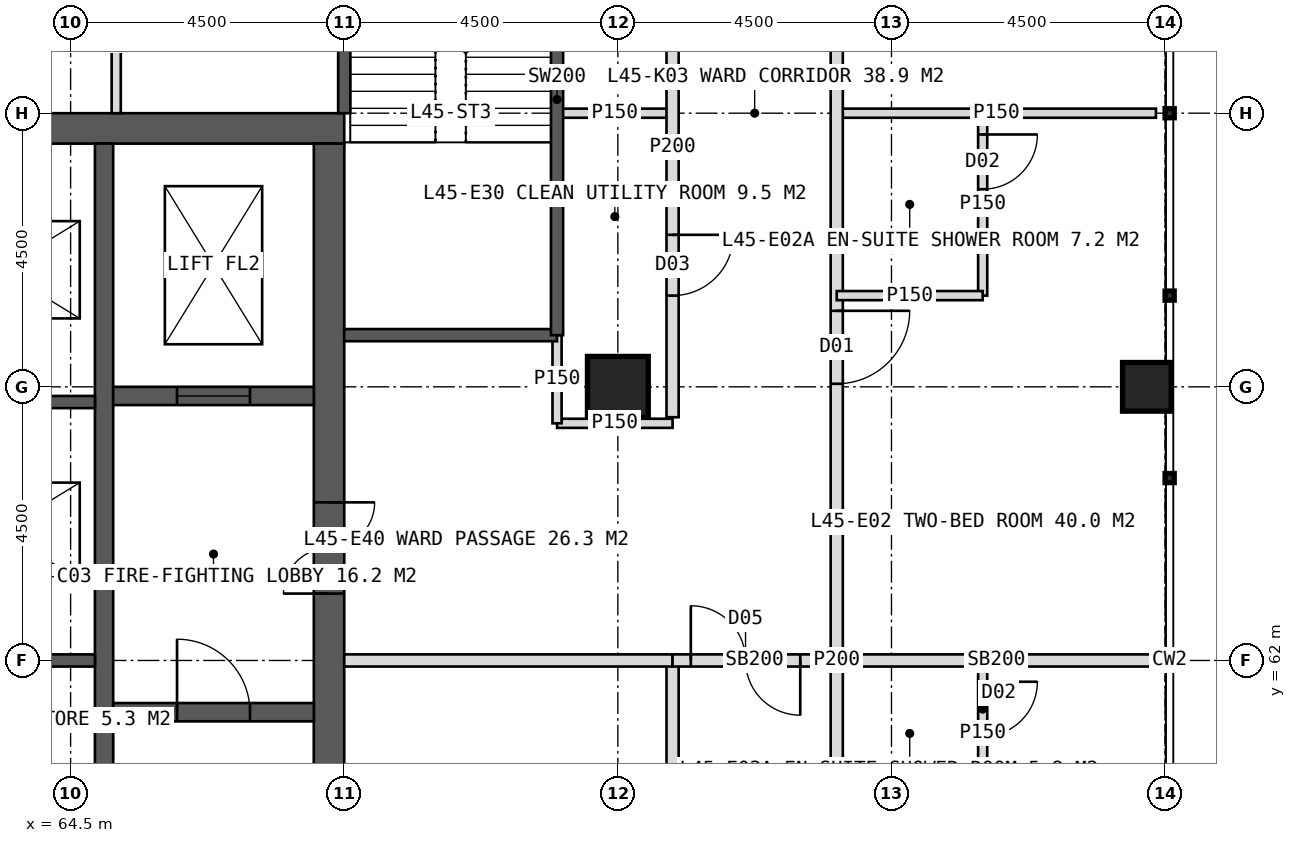
"""IFC4 building model, lengths in metres.
Left out: names, types, materials, properties, quantities, classifications, styles, units other than length and angle.
Written with IfcOpenShell. Run it as: python <this file> out.ifc"""

import sys

from ifc_helpers import new_model, si_unit, direction, frame, frame_2d, origin, origin_2d, place, context, subcontext, project, spatial, rectangle, hollow_rectangle, extrude, element, fill, save


model = new_model("IFC4")
c1 = context("Model", 3, precision=1e-05, world=origin(), true_north=direction((0.0, 1.0)))
c2 = subcontext(c1, "Body", "Model", "MODEL_VIEW")
j1 = project(units=[si_unit("LENGTHUNIT", "METRE"), si_unit("PLANEANGLEUNIT", "RADIAN")], contexts=[c1])
p1 = place(None, origin())
s1 = spatial("IfcSite", under=j1, at=p1, CompositionType="ELEMENT")
p2 = place(p1, origin())
s2 = spatial("IfcBuilding", under=s1, at=p2, CompositionType="ELEMENT")
p3 = place(p2, frame((0.0, 0.0, 189.0)))
s3 = spatial("IfcBuildingStorey", under=s2, at=p3, CompositionType="ELEMENT", Elevation=189.0)
p4 = place(p3, frame((51.0, 70.75, 0.0), z_axis=(0.0, 0.0, 1.0), x_axis=(1.0, 0.0, 0.0)))
e1 = element("IfcWall", 1, at=p4, inside=s3, PredefinedType="SHEAR", context=c2, shape_type="SweptSolid", body=[
    extrude(rectangle(XDim=18.0, YDim=0.5, at=frame_2d((9.0, 0.0))), origin(), (0.0, 0.0, 1.0), 4.0),
])
p5 = place(p4, frame((8.1, 0.0, 0.0)))
e2 = element("IfcOpeningElement", 2, at=p5, cuts=e1, PredefinedType="OPENING", context=c2, shape_type="SweptSolid", body=[
    extrude(rectangle(XDim=1.8, YDim=2.2, at=frame_2d((0.9, 1.1))), frame((0.0, 0.26, 0.0), z_axis=(0.0, -1.0, 0.0), x_axis=(1.0, 0.0, 0.0)), (0.0, 0.0, 1.0), 0.52),
])
p6 = place(p3, frame((68.75, 53.5, 0.0), z_axis=(0.0, 0.0, 1.0), x_axis=(0.0, 1.0, 0.0)))
e3 = element("IfcWall", 3, at=p6, inside=s3, PredefinedType="SHEAR", context=c2, shape_type="SweptSolid", body=[
    extrude(rectangle(XDim=17.0, YDim=0.5, at=frame_2d((8.5, 0.0))), origin(), (0.0, 0.0, 1.0), 4.0),
])
p7 = place(p6, frame((9.6, 0.0, 0.0)))
e4 = element("IfcOpeningElement", 4, at=p7, cuts=e3, PredefinedType="OPENING", context=c2, shape_type="SweptSolid", body=[
    extrude(rectangle(XDim=1.5, YDim=2.2, at=frame_2d((0.75, 1.1))), frame((0.0, 0.26, 0.0), z_axis=(0.0, -1.0, 0.0), x_axis=(1.0, 0.0, 0.0)), (0.0, 0.0, 1.0), 0.52),
])
p8 = place(p3, frame((65.05, 53.5, 0.0), z_axis=(0.0, 0.0, 1.0), x_axis=(0.0, 1.0, 0.0)))
e5 = element("IfcWall", 5, at=p8, inside=s3, PredefinedType="SHEAR", context=c2, shape_type="SweptSolid", body=[
    extrude(rectangle(XDim=17.0, YDim=0.3, at=frame_2d((8.5, 0.0))), origin(), (0.0, 0.0, 1.0), 4.0),
])
for number, where, z_axis, x_axis in (
    (6, (61.85, 62.0, 0.0), (0.0, 0.0, 1.0), (1.0, 0.0, 0.0)),
    (7, (61.85, 66.25, 0.0), (0.0, 0.0, 1.0), (1.0, 0.0, 0.0)),
):
    element("IfcWall", number, at=place(p3, frame(where, z_axis=z_axis, x_axis=x_axis)), inside=s3, PredefinedType="SHEAR", context=c2, shape_type="SweptSolid", body=[
        extrude(rectangle(XDim=3.05, YDim=0.2, at=frame_2d((1.525, 0.0))), origin(), (0.0, 0.0, 1.0), 4.0),
    ])
p9 = place(p3, frame((65.2, 61.15, 0.0), z_axis=(0.0, 0.0, 1.0), x_axis=(1.0, 0.0, 0.0)))
e8 = element("IfcWall", 8, at=p9, inside=s3, PredefinedType="SHEAR", context=c2, shape_type="SweptSolid", body=[
    extrude(rectangle(XDim=3.3, YDim=0.3, at=frame_2d((1.65, 0.0))), origin(), (0.0, 0.0, 1.0), 4.0),
])
p10 = place(p9, frame((1.05, 0.0, 0.0)))
e9 = element("IfcOpeningElement", 9, at=p10, cuts=e8, PredefinedType="OPENING", context=c2, shape_type="SweptSolid", body=[
    extrude(rectangle(XDim=1.2, YDim=2.1, at=frame_2d((0.6, 1.05))), frame((0.0, 0.16, 0.0), z_axis=(0.0, -1.0, 0.0), x_axis=(1.0, 0.0, 0.0)), (0.0, 0.0, 1.0), 0.32),
])
p11 = place(p3, frame((65.2, 66.35, 0.0), z_axis=(0.0, 0.0, 1.0), x_axis=(1.0, 0.0, 0.0)))
e10 = element("IfcWall", 10, at=p11, inside=s3, PredefinedType="SHEAR", context=c2, shape_type="SweptSolid", body=[
    extrude(rectangle(XDim=3.3, YDim=0.3, at=frame_2d((1.65, 0.0))), origin(), (0.0, 0.0, 1.0), 4.0),
])
p12 = place(p11, frame((1.05, 0.0, 0.0)))
e11 = element("IfcOpeningElement", 11, at=p12, cuts=e10, PredefinedType="OPENING", context=c2, shape_type="SweptSolid", body=[
    extrude(rectangle(XDim=1.2, YDim=2.2, at=frame_2d((0.6, 1.1))), frame((0.0, 0.16, 0.0), z_axis=(0.0, -1.0, 0.0), x_axis=(1.0, 0.0, 0.0)), (0.0, 0.0, 1.0), 0.32),
])
p13 = place(p3, frame((73.5, 66.5, 0.0), z_axis=(0.0, 0.0, 1.0), x_axis=(1.0, 0.0, 0.0)))
e12 = element("IfcColumn", 12, at=p13, inside=s3, PredefinedType="COLUMN", context=c2, shape_type="SweptSolid", body=[
    extrude(hollow_rectangle(XDim=1.0, YDim=1.0, WallThickness=0.1, at=origin_2d()), origin(), (0.0, 0.0, 1.0), 4.0),
])
p14 = place(p3, frame((82.2, 66.5, 0.0), z_axis=(0.0, 0.0, 1.0), x_axis=(1.0, 0.0, 0.0)))
e13 = element("IfcColumn", 13, at=p14, inside=s3, PredefinedType="COLUMN", context=c2, shape_type="SweptSolid", body=[
    extrude(hollow_rectangle(XDim=0.8, YDim=0.8, WallThickness=0.08, at=origin_2d()), origin(), (0.0, 0.0, 1.0), 4.0),
])
p15 = place(p3, frame((65.25, 71.0, 0.0), z_axis=(0.0, 0.0, 1.0), x_axis=(0.0, 1.0, 0.0)))
e14 = element("IfcWall", 14, at=p15, inside=s3, PredefinedType="PARTITIONING", context=c2, shape_type="SweptSolid", body=[
    extrude(rectangle(XDim=2.4, YDim=0.15, at=frame_2d((1.2, 0.0))), origin(), (0.0, 0.0, 1.0), 3.75),
])
p16 = place(p3, frame((77.1, 71.0, 0.0), z_axis=(0.0, 0.0, 1.0), x_axis=(1.0, 0.0, 0.0)))
e15 = element("IfcWall", 15, at=p16, inside=s3, PredefinedType="PARTITIONING", context=c2, shape_type="SweptSolid", body=[
    extrude(rectangle(XDim=5.25, YDim=0.15, at=frame_2d((2.625, 0.0))), origin(), (0.0, 0.0, 1.0), 3.75),
])
p17 = place(p3, frame((77.1, 62.0, 0.0), z_axis=(0.0, 0.0, 1.0), x_axis=(1.0, 0.0, 0.0)))
e16 = element("IfcWall", 16, at=p17, inside=s3, PredefinedType="SOLIDWALL", context=c2, shape_type="SweptSolid", body=[
    extrude(rectangle(XDim=5.25, YDim=0.2, at=frame_2d((2.625, 0.0))), origin(), (0.0, 0.0, 1.0), 2.95),
])
p18 = place(p3, frame((77.1, 79.1, 0.0), z_axis=(0.0, 0.0, 1.0), x_axis=(0.0, -1.0, 0.0)))
e17 = element("IfcWall", 17, at=p18, inside=s3, PredefinedType="PARTITIONING", context=c2, shape_type="SweptSolid", body=[
    extrude(rectangle(XDim=34.2, YDim=0.2, at=frame_2d((17.1, 0.0))), origin(), (0.0, 0.0, 1.0), 3.75),
])
p19 = place(p18, frame((3.25, 0.0, 0.0)))
e18 = element("IfcOpeningElement", 18, at=p19, cuts=e17, PredefinedType="OPENING", context=c2, shape_type="SweptSolid", body=[
    extrude(rectangle(XDim=1.2, YDim=2.2, at=frame_2d((0.6, 1.1))), frame((0.0, 0.11, 0.0), z_axis=(0.0, -1.0, 0.0), x_axis=(1.0, 0.0, 0.0)), (0.0, 0.0, 1.0), 0.22),
])
p20 = place(p18, frame((11.35, 0.0, 0.0)))
e19 = element("IfcOpeningElement", 19, at=p20, cuts=e17, PredefinedType="OPENING", context=c2, shape_type="SweptSolid", body=[
    extrude(rectangle(XDim=1.2, YDim=2.2, at=frame_2d((0.6, 1.1))), frame((0.0, 0.11, 0.0), z_axis=(0.0, -1.0, 0.0), x_axis=(1.0, 0.0, 0.0)), (0.0, 0.0, 1.0), 0.22),
])
p21 = place(p18, frame((19.75, 0.0, 0.0)))
e20 = element("IfcOpeningElement", 20, at=p21, cuts=e17, PredefinedType="OPENING", context=c2, shape_type="SweptSolid", body=[
    extrude(rectangle(XDim=1.2, YDim=2.2, at=frame_2d((0.6, 1.1))), frame((0.0, 0.11, 0.0), z_axis=(0.0, -1.0, 0.0), x_axis=(1.0, 0.0, 0.0)), (0.0, 0.0, 1.0), 0.22),
])
p22 = place(p18, frame((25.75, 0.0, 0.0)))
e21 = element("IfcOpeningElement", 21, at=p22, cuts=e17, PredefinedType="OPENING", context=c2, shape_type="SweptSolid", body=[
    extrude(rectangle(XDim=1.2, YDim=2.2, at=frame_2d((0.6, 1.1))), frame((0.0, 0.11, 0.0), z_axis=(0.0, -1.0, 0.0), x_axis=(1.0, 0.0, 0.0)), (0.0, 0.0, 1.0), 0.22),
])
p23 = place(p3, frame((79.5, 71.0, 0.0), z_axis=(0.0, 0.0, 1.0), x_axis=(0.0, -1.0, 0.0)))
e22 = element("IfcWall", 22, at=p23, inside=s3, PredefinedType="PARTITIONING", context=c2, shape_type="SweptSolid", body=[
    extrude(rectangle(XDim=3.0, YDim=0.15, at=frame_2d((1.5, 0.0))), origin(), (0.0, 0.0, 1.0), 3.75),
])
p24 = place(p23, frame((0.35, 0.0, 0.0)))
e23 = element("IfcOpeningElement", 23, at=p24, cuts=e22, PredefinedType="OPENING", context=c2, shape_type="SweptSolid", body=[
    extrude(rectangle(XDim=0.9, YDim=2.1, at=frame_2d((0.45, 1.05))), frame((0.0, 0.085, 0.0), z_axis=(0.0, -1.0, 0.0), x_axis=(1.0, 0.0, 0.0)), (0.0, 0.0, 1.0), 0.17),
])
p25 = place(p3, frame((77.1, 68.0, 0.0), z_axis=(0.0, 0.0, 1.0), x_axis=(1.0, 0.0, 0.0)))
e24 = element("IfcWall", 24, at=p25, inside=s3, PredefinedType="PARTITIONING", context=c2, shape_type="SweptSolid", body=[
    extrude(rectangle(XDim=2.4, YDim=0.15, at=frame_2d((1.2, 0.0))), origin(), (0.0, 0.0, 1.0), 3.75),
])
p26 = place(p3, frame((79.5, 62.0, 0.0), z_axis=(0.0, 0.0, 1.0), x_axis=(0.0, -1.0, 0.0)))
e25 = element("IfcWall", 25, at=p26, inside=s3, PredefinedType="PARTITIONING", context=c2, shape_type="SweptSolid", body=[
    extrude(rectangle(XDim=2.4, YDim=0.15, at=frame_2d((1.2, 0.0))), origin(), (0.0, 0.0, 1.0), 3.75),
])
p27 = place(p26, frame((0.35, 0.0, 0.0)))
e26 = element("IfcOpeningElement", 26, at=p27, cuts=e25, PredefinedType="OPENING", context=c2, shape_type="SweptSolid", body=[
    extrude(rectangle(XDim=0.9, YDim=2.1, at=frame_2d((0.45, 1.05))), frame((0.0, 0.085, 0.0), z_axis=(0.0, -1.0, 0.0), x_axis=(1.0, 0.0, 0.0)), (0.0, 0.0, 1.0), 0.17),
])
p28 = place(p3, frame((72.5, 71.0, 0.0), z_axis=(0.0, 0.0, 1.0), x_axis=(1.0, 0.0, 0.0)))
e27 = element("IfcWall", 27, at=p28, inside=s3, PredefinedType="PARTITIONING", context=c2, shape_type="SweptSolid", body=[
    extrude(rectangle(XDim=1.9, YDim=0.15, at=frame_2d((0.95, 0.0))), origin(), (0.0, 0.0, 1.0), 3.75),
])
p29 = place(p3, frame((74.4, 74.9, 0.0), z_axis=(0.0, 0.0, 1.0), x_axis=(0.0, -1.0, 0.0)))
e28 = element("IfcWall", 28, at=p29, inside=s3, PredefinedType="PARTITIONING", context=c2, shape_type="SweptSolid", body=[
    extrude(rectangle(XDim=8.9, YDim=0.2, at=frame_2d((4.45, 0.0))), origin(), (0.0, 0.0, 1.0), 3.75),
])
p30 = place(p29, frame((0.25, 0.0, 0.0)))
e29 = element("IfcOpeningElement", 29, at=p30, cuts=e28, PredefinedType="OPENING", context=c2, shape_type="SweptSolid", body=[
    extrude(rectangle(XDim=1.0, YDim=2.1, at=frame_2d((0.5, 1.05))), frame((0.0, 0.11, 0.0), z_axis=(0.0, -1.0, 0.0), x_axis=(1.0, 0.0, 0.0)), (0.0, 0.0, 1.0), 0.22),
])
p31 = place(p29, frame((5.9, 0.0, 0.0)))
e30 = element("IfcOpeningElement", 30, at=p31, cuts=e28, PredefinedType="OPENING", context=c2, shape_type="SweptSolid", body=[
    extrude(rectangle(XDim=1.0, YDim=2.1, at=frame_2d((0.5, 1.05))), frame((0.0, 0.11, 0.0), z_axis=(0.0, -1.0, 0.0), x_axis=(1.0, 0.0, 0.0)), (0.0, 0.0, 1.0), 0.22),
])
p32 = place(p3, frame((74.4, 62.0, 0.0), z_axis=(0.0, 0.0, 1.0), x_axis=(0.0, -1.0, 0.0)))
e31 = element("IfcWall", 31, at=p32, inside=s3, PredefinedType="PARTITIONING", context=c2, shape_type="SweptSolid", body=[
    extrude(rectangle(XDim=14.4, YDim=0.2, at=frame_2d((7.2, 0.0))), origin(), (0.0, 0.0, 1.0), 3.75),
])
p33 = place(p32, frame((2.5, 0.0, 0.0)))
e32 = element("IfcOpeningElement", 32, at=p33, cuts=e31, PredefinedType="OPENING", context=c2, shape_type="SweptSolid", body=[
    extrude(rectangle(XDim=1.0, YDim=2.1, at=frame_2d((0.5, 1.05))), frame((0.0, 0.11, 0.0), z_axis=(0.0, -1.0, 0.0), x_axis=(1.0, 0.0, 0.0)), (0.0, 0.0, 1.0), 0.22),
])
p34 = place(p32, frame((7.0, 0.0, 0.0)))
e33 = element("IfcOpeningElement", 33, at=p34, cuts=e31, PredefinedType="OPENING", context=c2, shape_type="SweptSolid", body=[
    extrude(rectangle(XDim=1.0, YDim=2.1, at=frame_2d((0.5, 1.05))), frame((0.0, 0.11, 0.0), z_axis=(0.0, -1.0, 0.0), x_axis=(1.0, 0.0, 0.0)), (0.0, 0.0, 1.0), 0.22),
])
p35 = place(p32, frame((11.2, 0.0, 0.0)))
e34 = element("IfcOpeningElement", 34, at=p35, cuts=e31, PredefinedType="OPENING", context=c2, shape_type="SweptSolid", body=[
    extrude(rectangle(XDim=1.0, YDim=2.1, at=frame_2d((0.5, 1.05))), frame((0.0, 0.11, 0.0), z_axis=(0.0, -1.0, 0.0), x_axis=(1.0, 0.0, 0.0)), (0.0, 0.0, 1.0), 0.22),
])
p36 = place(p3, frame((72.5, 65.9, 0.0), z_axis=(0.0, 0.0, 1.0), x_axis=(1.0, 0.0, 0.0)))
e35 = element("IfcWall", 35, at=p36, inside=s3, PredefinedType="PARTITIONING", context=c2, shape_type="SweptSolid", body=[
    extrude(rectangle(XDim=1.9, YDim=0.15, at=frame_2d((0.95, 0.0))), origin(), (0.0, 0.0, 1.0), 3.75),
])
p37 = place(p3, frame((69.0, 62.0, 0.0), z_axis=(0.0, 0.0, 1.0), x_axis=(1.0, 0.0, 0.0)))
e36 = element("IfcWall", 36, at=p37, inside=s3, PredefinedType="SOLIDWALL", context=c2, shape_type="SweptSolid", body=[
    extrude(rectangle(XDim=5.4, YDim=0.2, at=frame_2d((2.7, 0.0))), origin(), (0.0, 0.0, 1.0), 2.95),
])
p38 = place(p3, frame((74.4, 62.0, 0.0), z_axis=(0.0, 0.0, 1.0), x_axis=(1.0, 0.0, 0.0)))
e37 = element("IfcWall", 37, at=p38, inside=s3, PredefinedType="SOLIDWALL", context=c2, shape_type="SweptSolid", body=[
    extrude(rectangle(XDim=2.7, YDim=0.2, at=frame_2d((1.35, 0.0))), origin(), (0.0, 0.0, 1.0), 2.95),
])
p39 = place(p38, frame((0.3, 0.0, 0.0)))
e38 = element("IfcOpeningElement", 38, at=p39, cuts=e37, PredefinedType="OPENING", context=c2, shape_type="SweptSolid", body=[
    extrude(rectangle(XDim=1.8, YDim=2.2, at=frame_2d((0.9, 1.1))), frame((0.0, 0.11, 0.0), z_axis=(0.0, -1.0, 0.0), x_axis=(1.0, 0.0, 0.0)), (0.0, 0.0, 1.0), 0.22),
])
p40 = place(p3, frame((72.5, 65.9, 0.0), z_axis=(0.0, 0.0, 1.0), x_axis=(0.0, 1.0, 0.0)))
e39 = element("IfcWall", 39, at=p40, inside=s3, PredefinedType="PARTITIONING", context=c2, shape_type="SweptSolid", body=[
    extrude(rectangle(XDim=1.45, YDim=0.15, at=frame_2d((0.725, 0.0))), origin(), (0.0, 0.0, 1.0), 3.75),
])
p41 = place(p3, frame((69.0, 71.0, 0.0), z_axis=(0.0, 0.0, 1.0), x_axis=(0.0, 1.0, 0.0)))
e40 = element("IfcWall", 40, at=p41, inside=s3, PredefinedType="SOLIDWALL", context=c2, shape_type="SweptSolid", body=[
    extrude(rectangle(XDim=4.1, YDim=0.2, at=frame_2d((2.05, 0.0))), origin(), (0.0, 0.0, 1.0), 3.75),
])
p42 = place(p3, frame((69.0, 67.35, 0.0), z_axis=(0.0, 0.0, 1.0), x_axis=(1.0, 0.0, 0.0)))
e41 = element("IfcWall", 41, at=p42, inside=s3, PredefinedType="SOLIDWALL", context=c2, shape_type="SweptSolid", body=[
    extrude(rectangle(XDim=3.5, YDim=0.2, at=frame_2d((1.75, 0.0))), origin(), (0.0, 0.0, 1.0), 3.75),
])
p43 = place(p3, frame((72.5, 67.35, 0.0), z_axis=(0.0, 0.0, 1.0), x_axis=(0.0, 1.0, 0.0)))
e42 = element("IfcWall", 42, at=p43, inside=s3, PredefinedType="SOLIDWALL", context=c2, shape_type="SweptSolid", body=[
    extrude(rectangle(XDim=7.75, YDim=0.2, at=frame_2d((3.875, 0.0))), origin(), (0.0, 0.0, 1.0), 3.75),
])
p44 = place(p20, origin())
e43 = element("IfcDoor", 43, at=p44, inside=s3, OperationType="SINGLE_SWING_LEFT", PredefinedType="DOOR", context=c2, shape_type="SweptSolid", body=[
    extrude(rectangle(XDim=1.2, YDim=2.2, at=frame_2d((0.6, 1.1))), frame((0.0, 0.025, 0.0), z_axis=(0.0, -1.0, 0.0), x_axis=(1.0, 0.0, 0.0)), (0.0, 0.0, 1.0), 0.05),
])
fill(e19, e43)
p45 = place(p24, origin())
e44 = element("IfcDoor", 44, at=p45, inside=s3, OperationType="SINGLE_SWING_LEFT", PredefinedType="DOOR", context=c2, shape_type="SweptSolid", body=[
    extrude(rectangle(XDim=0.9, YDim=2.1, at=frame_2d((0.45, 1.05))), frame((0.0, 0.025, 0.0), z_axis=(0.0, -1.0, 0.0), x_axis=(1.0, 0.0, 0.0)), (0.0, 0.0, 1.0), 0.05),
])
fill(e23, e44)
p46 = place(p27, origin())
e45 = element("IfcDoor", 45, at=p46, inside=s3, OperationType="SINGLE_SWING_LEFT", PredefinedType="DOOR", context=c2, shape_type="SweptSolid", body=[
    extrude(rectangle(XDim=0.9, YDim=2.1, at=frame_2d((0.45, 1.05))), frame((0.0, 0.025, 0.0), z_axis=(0.0, -1.0, 0.0), x_axis=(1.0, 0.0, 0.0)), (0.0, 0.0, 1.0), 0.05),
])
fill(e26, e45)
p47 = place(p31, origin())
e46 = element("IfcDoor", 46, at=p47, inside=s3, OperationType="SINGLE_SWING_LEFT", PredefinedType="DOOR", context=c2, shape_type="SweptSolid", body=[
    extrude(rectangle(XDim=1.0, YDim=2.1, at=frame_2d((0.5, 1.05))), frame((0.0, 0.025, 0.0), z_axis=(0.0, -1.0, 0.0), x_axis=(1.0, 0.0, 0.0)), (0.0, 0.0, 1.0), 0.05),
])
fill(e30, e46)
p48 = place(p39, origin())
e47 = element("IfcDoor", 47, at=p48, inside=s3, OperationType="DOUBLE_DOOR_DOUBLE_SWING", PredefinedType="DOOR", context=c2, shape_type="SweptSolid", body=[
    extrude(rectangle(XDim=1.8, YDim=2.2, at=frame_2d((0.9, 1.1))), frame((0.0, 0.025, 0.0), z_axis=(0.0, -1.0, 0.0), x_axis=(1.0, 0.0, 0.0)), (0.0, 0.0, 1.0), 0.05),
])
fill(e38, e47)
p49 = place(p7, origin())
e48 = element("IfcDoor", 48, at=p49, inside=s3, OperationType="DOUBLE_DOOR_SINGLE_SWING", PredefinedType="DOOR", context=c2, shape_type="SweptSolid", body=[
    extrude(rectangle(XDim=1.5, YDim=2.2, at=frame_2d((0.75, 1.1))), frame((0.0, 0.025, 0.0), z_axis=(0.0, -1.0, 0.0), x_axis=(1.0, 0.0, 0.0)), (0.0, 0.0, 1.0), 0.05),
])
fill(e4, e48)
p50 = place(p10, origin())
e49 = element("IfcDoor", 49, at=p50, inside=s3, OperationType="SINGLE_SWING_LEFT", PredefinedType="DOOR", context=c2, shape_type="SweptSolid", body=[
    extrude(rectangle(XDim=1.2, YDim=2.1, at=frame_2d((0.6, 1.05))), frame((0.0, 0.025, 0.0), z_axis=(0.0, -1.0, 0.0), x_axis=(1.0, 0.0, 0.0)), (0.0, 0.0, 1.0), 0.05),
])
fill(e9, e49)
p51 = place(p12, origin())
e50 = element("IfcDoor", 50, at=p51, inside=s3, OperationType="SLIDING_TO_LEFT", PredefinedType="DOOR", context=c2, shape_type="SweptSolid", body=[
    extrude(rectangle(XDim=1.2, YDim=2.2, at=frame_2d((0.6, 1.1))), frame((0.0, 0.025, 0.0), z_axis=(0.0, -1.0, 0.0), x_axis=(1.0, 0.0, 0.0)), (0.0, 0.0, 1.0), 0.05),
])
fill(e11, e50)
save(model, sys.argv[1])
